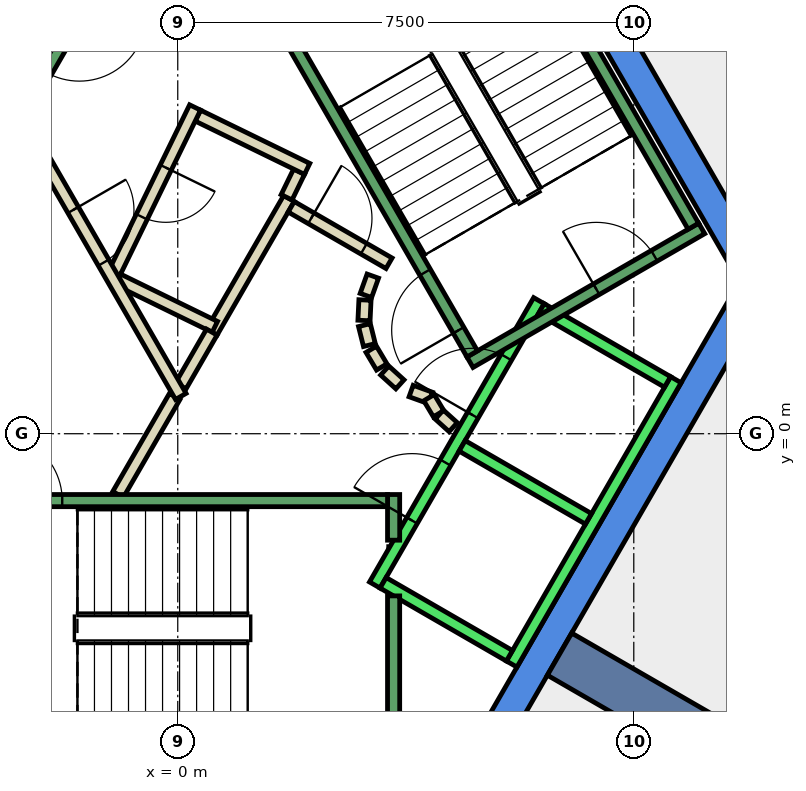
"""IFC4 building model, lengths in metres.
Left out: names, types, materials, properties, quantities, classifications, styles, units other than length and angle.
Written with IfcOpenShell. Run it as: python <this file> out.ifc"""

import sys

from ifc_helpers import new_model, si_unit, direction, frame, frame_2d, origin, place, context, subcontext, project, spatial, polyline, rectangle, outline, extrude, element, fill, save


model = new_model("IFC4")
c1 = context("Model", 3, precision=1e-05, world=origin(), true_north=direction((0.0, 1.0)))
c2 = subcontext(c1, "Body", "Model", "MODEL_VIEW")
j1 = project(units=[si_unit("LENGTHUNIT", "METRE"), si_unit("PLANEANGLEUNIT", "RADIAN")], contexts=[c1])
p1 = place(None, origin())
s1 = spatial("IfcSite", under=j1, at=p1, CompositionType="ELEMENT")
p2 = place(p1, origin())
s2 = spatial("IfcBuilding", under=s1, at=p2, CompositionType="ELEMENT")
p3 = place(p2, frame((0.0, 0.0, 308.0)))
s3 = spatial("IfcBuildingStorey", under=s2, at=p3, CompositionType="ELEMENT", Elevation=308.0)
p4 = place(p3, frame((0.0, 0.0, -0.34)))
e1 = element("IfcWall", 1, at=p4, inside=s3, PredefinedType="SHEAR", context=c2, shape_type="SweptSolid", body=[
    extrude(outline(polyline([(5.486, 9.998), (5.053, 9.748), (9.238, 2.5), (9.815, 2.5), (5.486, 9.998)])), origin(), (0.0, 0.0, 1.0), 3.6),
])
p5 = place(p3, frame((0.0, 0.0, -0.34)))
e2 = element("IfcWall", 2, at=p5, inside=s3, PredefinedType="SHEAR", context=c2, shape_type="SweptSolid", body=[
    extrude(outline(polyline([(4.907, -6.0), (9.815, 2.5), (9.238, 2.5), (4.619, -5.5), (4.907, -6.0)])), origin(), (0.0, 0.0, 1.0), 3.6),
])
p6 = place(p3, frame((6.279, -3.625, -0.34), z_axis=(0.0, 0.0, 1.0), x_axis=(0.866017533419, -0.500013631625, 0.0)))
e3 = element("IfcWall", 3, at=p6, inside=s3, PredefinedType="SHEAR", context=c2, shape_type="SweptSolid", body=[
    extrude(rectangle(XDim=9.0, YDim=0.8, at=frame_2d((4.5, 0.0))), origin(), (0.0, 0.0, 1.0), 3.6),
])
p7 = place(p3, frame((0.56, 1.671, 0.0), z_axis=(0.0, 0.0, 1.0), x_axis=(0.500008334558, 0.866020591771, 0.0)))
e4 = element("IfcWall", 4, at=p7, inside=s3, PredefinedType="PARTITIONING", context=c2, shape_type="SweptSolid", body=[
    extrude(rectangle(XDim=2.538, YDim=0.2, at=frame_2d((1.269, 0.0))), origin(), (0.0, 0.0, 1.0), 3.26),
])
p8 = place(p3, frame((1.79, 3.888, 0.0), z_axis=(0.0, 0.0, 1.0), x_axis=(0.437807406823, 0.899068781869, 0.0)))
e5 = element("IfcWall", 5, at=p8, inside=s3, PredefinedType="PARTITIONING", context=c2, shape_type="SweptSolid", body=[
    extrude(rectangle(XDim=0.469, YDim=0.2, at=frame_2d((0.234, 0.0))), origin(), (0.0, 0.0, 1.0), 3.26),
])
p9 = place(p3, frame((2.128, 4.355, 0.0), z_axis=(0.0, 0.0, 1.0), x_axis=(-0.898876404494, 0.438202247191, 0.0)))
e6 = element("IfcWall", 6, at=p9, inside=s3, PredefinedType="PARTITIONING", context=c2, shape_type="SweptSolid", body=[
    extrude(rectangle(XDim=1.999, YDim=0.2, at=frame_2d((1.0, 0.0))), origin(), (0.0, 0.0, 1.0), 3.26),
])
p10 = place(p3, frame((0.285, 5.365, 0.0), z_axis=(0.0, 0.0, 1.0), x_axis=(-0.43840190643, -0.898779043168, 0.0)))
e7 = element("IfcWall", 7, at=p10, inside=s3, PredefinedType="PARTITIONING", context=c2, shape_type="SweptSolid", body=[
    extrude(rectangle(XDim=3.1, YDim=0.2, at=frame_2d((1.55, 0.0))), origin(), (0.0, 0.0, 1.0), 3.26),
])
p11 = place(p10, frame((1.1, 0.0, 0.0)))
e8 = element("IfcOpeningElement", 8, at=p11, cuts=e7, PredefinedType="OPENING", context=c2, shape_type="SweptSolid", body=[
    extrude(rectangle(XDim=0.9, YDim=2.1, at=frame_2d((0.45, 1.05))), frame((0.0, 0.11, 0.0), z_axis=(0.0, -1.0, 0.0), x_axis=(1.0, 0.0, 0.0)), (0.0, 0.0, 1.0), 0.22),
])
p12 = place(p3, frame((-0.984, 2.535, 0.0), z_axis=(0.0, 0.0, 1.0), x_axis=(0.898707583217, -0.438548378025, 0.0)))
e9 = element("IfcWall", 9, at=p12, inside=s3, PredefinedType="PARTITIONING", context=c2, shape_type="SweptSolid", body=[
    extrude(rectangle(XDim=1.774, YDim=0.2, at=frame_2d((0.887, 0.0))), origin(), (0.0, 0.0, 1.0), 3.26),
])
p13 = place(p3, frame((8.588, 9.665, 0.0), z_axis=(0.0, 0.0, 1.0), x_axis=(0.499946799636, -0.86605611685, 0.0)))
e10 = element("IfcWall", 10, at=p13, inside=s3, PredefinedType="PARTITIONING", context=c2, shape_type="SweptSolid", body=[
    extrude(rectangle(XDim=8.227, YDim=0.2, at=frame_2d((4.114, 0.0))), origin(), (0.0, 0.0, 1.0), 3.26),
])
p14 = place(p13, frame((3.613, 0.0, 0.0)))
e11 = element("IfcOpeningElement", 11, at=p14, cuts=e10, PredefinedType="OPENING", context=c2, shape_type="SweptSolid", body=[
    extrude(rectangle(XDim=1.0, YDim=2.1, at=frame_2d((0.5, 1.05))), frame((0.0, 0.11, 0.0), z_axis=(0.0, -1.0, 0.0), x_axis=(1.0, 0.0, 0.0)), (0.0, 0.0, 1.0), 0.22),
])
p15 = place(p3, frame((-0.982, -1.0, 0.0), z_axis=(0.0, 0.0, 1.0), x_axis=(0.50024047865, 0.865886518847, 0.0)))
e12 = element("IfcWall", 12, at=p15, inside=s3, PredefinedType="PARTITIONING", context=c2, shape_type="SweptSolid", body=[
    extrude(rectangle(XDim=1.863, YDim=0.2, at=frame_2d((0.931, 0.0))), origin(), (0.0, 0.0, 1.0), 3.26),
])
p16 = place(p3, frame((0.05, 0.787, 0.0), z_axis=(0.0, 0.0, 1.0), x_axis=(0.499819111317, 0.866129814729, 0.0)))
e13 = element("IfcWall", 13, at=p16, inside=s3, PredefinedType="PARTITIONING", context=c2, shape_type="SweptSolid", body=[
    extrude(rectangle(XDim=1.021, YDim=0.2, at=frame_2d((0.51, 0.0))), origin(), (0.0, 0.0, 1.0), 3.26),
])
p17 = place(p3, frame((1.866, 3.732, 0.0), z_axis=(0.0, 0.0, 1.0), x_axis=(0.866043361281, -0.499968895414, 0.0)))
e14 = element("IfcWall", 14, at=p17, inside=s3, PredefinedType="PARTITIONING", context=c2, shape_type="SweptSolid", body=[
    extrude(rectangle(XDim=1.858, YDim=0.2, at=frame_2d((0.929, 0.0))), origin(), (0.0, 0.0, 1.0), 3.26),
])
p18 = place(p17, frame((0.379, 0.0, 0.0)))
e15 = element("IfcOpeningElement", 15, at=p18, cuts=e14, PredefinedType="OPENING", context=c2, shape_type="SweptSolid", body=[
    extrude(rectangle(XDim=1.0, YDim=2.1, at=frame_2d((0.5, 1.05))), frame((0.0, 0.11, 0.0), z_axis=(0.0, -1.0, 0.0), x_axis=(1.0, 0.0, 0.0)), (0.0, 0.0, 1.0), 0.22),
])
p19 = place(p3, frame((3.208, 2.592, 0.0), z_axis=(0.0, 0.0, 1.0), x_axis=(-0.337388820924, -0.941365382578, 0.0)))
e16 = element("IfcWall", 16, at=p19, inside=s3, PredefinedType="PARTITIONING", context=c2, shape_type="SweptSolid", body=[
    extrude(rectangle(XDim=0.338, YDim=0.2, at=frame_2d((0.169, 0.0))), origin(), (0.0, 0.0, 1.0), 3.26),
])
p20 = place(p3, frame((3.079, 2.199, 0.0), z_axis=(0.0, 0.0, 1.0), x_axis=(-0.047771483479, -0.998858290933, 0.0)))
e17 = element("IfcWall", 17, at=p20, inside=s3, PredefinedType="PARTITIONING", context=c2, shape_type="SweptSolid", body=[
    extrude(rectangle(XDim=0.337, YDim=0.2, at=frame_2d((0.169, 0.0))), origin(), (0.0, 0.0, 1.0), 3.26),
])
p21 = place(p3, frame((3.07, 1.786, 0.0), z_axis=(0.0, 0.0, 1.0), x_axis=(0.242705583207, -0.970099994784, 0.0)))
e18 = element("IfcWall", 18, at=p21, inside=s3, PredefinedType="PARTITIONING", context=c2, shape_type="SweptSolid", body=[
    extrude(rectangle(XDim=0.338, YDim=0.2, at=frame_2d((0.169, 0.0))), origin(), (0.0, 0.0, 1.0), 3.26),
])
for number, where, z_axis, x_axis in (
    (19, (3.182, 1.388, 0.0), (0.0, 0.0, 1.0), (0.512, -0.859, 0.0)),
    (20, (3.404, 1.039, 0.0), (0.0, 0.0, 1.0), (0.74, -0.672, 0.0)),
):
    element("IfcWall", number, at=place(p3, frame(where, z_axis=z_axis, x_axis=x_axis)), inside=s3, PredefinedType="PARTITIONING", context=c2, shape_type="SweptSolid", body=[
        extrude(rectangle(XDim=0.338, YDim=0.2, at=frame_2d((0.169, 0.0))), origin(), (0.0, 0.0, 1.0), 3.26),
    ])
p22 = place(p3, frame((3.838, 0.702, 0.0), z_axis=(0.0, 0.0, 1.0), x_axis=(0.941035081519, -0.338308993895, 0.0)))
e21 = element("IfcWall", 21, at=p22, inside=s3, PredefinedType="PARTITIONING", context=c2, shape_type="SweptSolid", body=[
    extrude(rectangle(XDim=0.337, YDim=0.2, at=frame_2d((0.168, 0.0))), origin(), (0.0, 0.0, 1.0), 3.26),
])
p23 = place(p3, frame((4.132, 0.593, 0.0), z_axis=(0.0, 0.0, 1.0), x_axis=(0.513561617048, -0.858052717201, 0.0)))
e22 = element("IfcWall", 22, at=p23, inside=s3, PredefinedType="PARTITIONING", context=c2, shape_type="SweptSolid", body=[
    extrude(rectangle(XDim=0.308, YDim=0.2, at=frame_2d((0.154, 0.0))), origin(), (0.0, 0.0, 1.0), 3.26),
])
p24 = place(p3, frame((4.301, 0.315, 0.0), z_axis=(0.0, 0.0, 1.0), x_axis=(0.741798017506, -0.670623367639, 0.0)))
e23 = element("IfcWall", 23, at=p24, inside=s3, PredefinedType="PARTITIONING", context=c2, shape_type="SweptSolid", body=[
    extrude(rectangle(XDim=0.309, YDim=0.2, at=frame_2d((0.154, 0.0))), origin(), (0.0, 0.0, 1.0), 3.26),
])
p25 = place(p3, frame((-2.54, 5.1, 0.0), z_axis=(0.0, 0.0, 1.0), x_axis=(0.499925051871, -0.866068670783, 0.0)))
e24 = element("IfcWall", 24, at=p25, inside=s3, PredefinedType="PARTITIONING", context=c2, shape_type="SweptSolid", body=[
    extrude(rectangle(XDim=5.181, YDim=0.2, at=frame_2d((2.59, 0.0))), origin(), (0.0, 0.0, 1.0), 3.26),
])
p26 = place(p25, frame((1.64, 0.0, 0.0)))
e25 = element("IfcOpeningElement", 25, at=p26, cuts=e24, PredefinedType="OPENING", context=c2, shape_type="SweptSolid", body=[
    extrude(rectangle(XDim=1.0, YDim=2.1, at=frame_2d((0.5, 1.05))), frame((0.0, 0.11, 0.0), z_axis=(0.0, -1.0, 0.0), x_axis=(1.0, 0.0, 0.0)), (0.0, 0.0, 1.0), 0.22),
])
p27 = place(p3, frame((3.24, -2.488, 0.0), z_axis=(0.0, 0.0, 1.0), x_axis=(0.500034260056, 0.866005622828, 0.0)))
e26 = element("IfcWall", 26, at=p27, inside=s3, PredefinedType="STANDARD", context=c2, shape_type="SweptSolid", body=[
    extrude(rectangle(XDim=5.399, YDim=0.2, at=frame_2d((2.7, 0.0))), origin(), (0.0, 0.0, 1.0), 3.26),
])
p28 = place(p27, frame((3.225, 0.0, 0.0)))
e27 = element("IfcOpeningElement", 27, at=p28, cuts=e26, PredefinedType="OPENING", context=c2, shape_type="SweptSolid", body=[
    extrude(rectangle(XDim=1.1, YDim=2.1, at=frame_2d((0.55, 1.05))), frame((0.0, 0.11, 0.0), z_axis=(0.0, -1.0, 0.0), x_axis=(1.0, 0.0, 0.0)), (0.0, 0.0, 1.0), 0.22),
])
p29 = place(p27, frame((1.225, 0.0, 0.0)))
e28 = element("IfcOpeningElement", 28, at=p29, cuts=e26, PredefinedType="OPENING", context=c2, shape_type="SweptSolid", body=[
    extrude(rectangle(XDim=1.1, YDim=2.1, at=frame_2d((0.55, 1.05))), frame((0.0, 0.11, 0.0), z_axis=(0.0, -1.0, 0.0), x_axis=(1.0, 0.0, 0.0)), (0.0, 0.0, 1.0), 0.22),
])
p30 = place(p3, frame((5.492, -3.788, 0.0), z_axis=(0.0, 0.0, 1.0), x_axis=(0.500034260056, 0.866005622828, 0.0)))
e29 = element("IfcWall", 29, at=p30, inside=s3, PredefinedType="STANDARD", context=c2, shape_type="SweptSolid", body=[
    extrude(rectangle(XDim=5.399, YDim=0.2, at=frame_2d((2.7, 0.0))), origin(), (0.0, 0.0, 1.0), 3.26),
])
p31 = place(p3, frame((3.377, -2.452, 0.0), z_axis=(0.0, 0.0, 1.0), x_axis=(0.865955154139, -0.50012165622, 0.0)))
e30 = element("IfcWall", 30, at=p31, inside=s3, PredefinedType="STANDARD", context=c2, shape_type="SweptSolid", body=[
    extrude(rectangle(XDim=2.4, YDim=0.2, at=frame_2d((1.2, 0.0))), origin(), (0.0, 0.0, 1.0), 3.26),
])
for number, where, z_axis, x_axis in (
    (31, (4.677, -0.2, 0.0), (0.0, 0.0, 1.0), (0.866, -0.5, 0.0)),
    (32, (5.977, 2.052, 0.0), (0.0, 0.0, 1.0), (0.866, -0.5, 0.0)),
):
    element("IfcWall", number, at=place(p3, frame(where, z_axis=z_axis, x_axis=x_axis)), inside=s3, PredefinedType="STANDARD", context=c2, shape_type="SweptSolid", body=[
        extrude(rectangle(XDim=2.399, YDim=0.2, at=frame_2d((1.2, 0.0))), origin(), (0.0, 0.0, 1.0), 3.26),
    ])
p32 = place(p3, frame((3.55, -2.667, 0.0), z_axis=(0.0, 0.0, 1.0), x_axis=(0.0, -1.0, 0.0)))
e33 = element("IfcWall", 33, at=p32, inside=s3, PredefinedType="STANDARD", context=c2, shape_type="SweptSolid", body=[
    extrude(rectangle(XDim=2.733, YDim=0.2, at=frame_2d((1.366, 0.0))), origin(), (0.0, 0.0, 1.0), 3.26),
])
p33 = place(p3, frame((3.55, -1.0, 0.0), z_axis=(0.0, 0.0, 1.0), x_axis=(0.0, -1.0, 0.0)))
e34 = element("IfcWall", 34, at=p33, inside=s3, PredefinedType="STANDARD", context=c2, shape_type="SweptSolid", body=[
    extrude(rectangle(XDim=0.751, YDim=0.2, at=frame_2d((0.375, 0.0))), origin(), (0.0, 0.0, 1.0), 3.26),
])
p34 = place(p3, frame((-3.45, -1.1, 0.0), z_axis=(0.0, 0.0, 1.0), x_axis=(1.0, 0.0, 0.0)))
e35 = element("IfcWall", 35, at=p34, inside=s3, PredefinedType="STANDARD", context=c2, shape_type="SweptSolid", body=[
    extrude(rectangle(XDim=6.9, YDim=0.2, at=frame_2d((3.45, 0.0))), origin(), (0.0, 0.0, 1.0), 3.26),
])
p35 = place(p34, frame((0.45, 0.0, 0.0)))
e36 = element("IfcOpeningElement", 36, at=p35, cuts=e35, PredefinedType="OPENING", context=c2, shape_type="SweptSolid", body=[
    extrude(rectangle(XDim=1.1, YDim=2.2, at=frame_2d((0.55, 1.1))), frame((0.0, 0.11, 0.0), z_axis=(0.0, -1.0, 0.0), x_axis=(1.0, 0.0, 0.0)), (0.0, 0.0, 1.0), 0.22),
])
p36 = place(p3, frame((4.806, 1.176, 0.0), z_axis=(0.0, 0.0, 1.0), x_axis=(0.866059941101, 0.499940174841, 0.0)))
e37 = element("IfcWall", 37, at=p36, inside=s3, PredefinedType="STANDARD", context=c2, shape_type="SweptSolid", body=[
    extrude(rectangle(XDim=4.4, YDim=0.2, at=frame_2d((2.2, 0.0))), origin(), (0.0, 0.0, 1.0), 3.26),
])
p37 = place(p36, frame((2.4, 0.0, 0.0)))
e38 = element("IfcOpeningElement", 38, at=p37, cuts=e37, PredefinedType="OPENING", context=c2, shape_type="SweptSolid", body=[
    extrude(rectangle(XDim=1.1, YDim=2.2, at=frame_2d((0.55, 1.1))), frame((0.0, 0.11, 0.0), z_axis=(0.0, -1.0, 0.0), x_axis=(1.0, 0.0, 0.0)), (0.0, 0.0, 1.0), 0.22),
])
p38 = place(p3, frame((4.843, 1.312, 0.0), z_axis=(0.0, 0.0, 1.0), x_axis=(-0.499963383562, 0.866046543262, 0.0)))
e39 = element("IfcWall", 39, at=p38, inside=s3, PredefinedType="STANDARD", context=c2, shape_type="SweptSolid", body=[
    extrude(rectangle(XDim=6.9, YDim=0.2, at=frame_2d((3.45, 0.0))), origin(), (0.0, 0.0, 1.0), 3.26),
])
p39 = place(p38, frame((0.45, 0.0, 0.0)))
e40 = element("IfcOpeningElement", 40, at=p39, cuts=e39, PredefinedType="OPENING", context=c2, shape_type="SweptSolid", body=[
    extrude(rectangle(XDim=1.1, YDim=2.2, at=frame_2d((0.55, 1.1))), frame((0.0, 0.11, 0.0), z_axis=(0.0, -1.0, 0.0), x_axis=(1.0, 0.0, 0.0)), (0.0, 0.0, 1.0), 0.22),
])
p40 = place(p3, frame((8.48, 3.412, 0.0), z_axis=(0.0, 0.0, 1.0), x_axis=(-0.499978703459, 0.866037698999, 0.0)))
e41 = element("IfcWall", 41, at=p40, inside=s3, PredefinedType="STANDARD", context=c2, shape_type="SweptSolid", body=[
    extrude(rectangle(XDim=6.9, YDim=0.2, at=frame_2d((3.45, 0.0))), origin(), (0.0, 0.0, 1.0), 3.26),
])
p41 = place(p3, frame((-1.393, 7.288, 0.0), z_axis=(0.0, 0.0, 1.0), x_axis=(-0.499963383562, -0.866046543262, 0.0)))
e42 = element("IfcWall", 42, at=p41, inside=s3, PredefinedType="STANDARD", context=c2, shape_type="SweptSolid", body=[
    extrude(rectangle(XDim=6.9, YDim=0.2, at=frame_2d((3.45, 0.0))), origin(), (0.0, 0.0, 1.0), 3.26),
])
p42 = place(p41, frame((0.45, 0.0, 0.0)))
e43 = element("IfcOpeningElement", 43, at=p42, cuts=e42, PredefinedType="OPENING", context=c2, shape_type="SweptSolid", body=[
    extrude(rectangle(XDim=1.1, YDim=2.2, at=frame_2d((0.55, 1.1))), frame((0.0, 0.11, 0.0), z_axis=(0.0, -1.0, 0.0), x_axis=(1.0, 0.0, 0.0)), (0.0, 0.0, 1.0), 0.22),
])
p43 = place(p18, origin())
e44 = element("IfcDoor", 44, at=p43, inside=s3, OperationType="SINGLE_SWING_LEFT", PredefinedType="DOOR", context=c2, shape_type="SweptSolid", body=[
    extrude(rectangle(XDim=1.0, YDim=2.1, at=frame_2d((0.5, 1.05))), frame((0.0, 0.025, 0.0), z_axis=(0.0, -1.0, 0.0), x_axis=(1.0, 0.0, 0.0)), (0.0, 0.0, 1.0), 0.05),
])
fill(e15, e44)
p44 = place(p26, origin())
e45 = element("IfcDoor", 45, at=p44, inside=s3, OperationType="SINGLE_SWING_RIGHT", PredefinedType="DOOR", context=c2, shape_type="SweptSolid", body=[
    extrude(rectangle(XDim=1.0, YDim=2.1, at=frame_2d((0.5, 1.05))), frame((0.0, 0.025, 0.0), z_axis=(0.0, -1.0, 0.0), x_axis=(1.0, 0.0, 0.0)), (0.0, 0.0, 1.0), 0.05),
])
fill(e25, e45)
p45 = place(p11, origin())
e46 = element("IfcDoor", 46, at=p45, inside=s3, OperationType="SINGLE_SWING_RIGHT", PredefinedType="DOOR", context=c2, shape_type="SweptSolid", body=[
    extrude(rectangle(XDim=0.9, YDim=2.1, at=frame_2d((0.45, 1.05))), frame((0.0, 0.025, 0.0), z_axis=(0.0, -1.0, 0.0), x_axis=(1.0, 0.0, 0.0)), (0.0, 0.0, 1.0), 0.05),
])
fill(e8, e46)
p46 = place(p28, origin())
e47 = element("IfcDoor", 47, at=p46, inside=s3, OperationType="SLIDING_TO_LEFT", PredefinedType="DOOR", context=c2, shape_type="SweptSolid", body=[
    extrude(rectangle(XDim=1.1, YDim=2.1, at=frame_2d((0.55, 1.05))), frame((0.0, 0.025, 0.0), z_axis=(0.0, -1.0, 0.0), x_axis=(1.0, 0.0, 0.0)), (0.0, 0.0, 1.0), 0.05),
])
fill(e27, e47)
p47 = place(p29, origin())
e48 = element("IfcDoor", 48, at=p47, inside=s3, OperationType="SLIDING_TO_LEFT", PredefinedType="DOOR", context=c2, shape_type="SweptSolid", body=[
    extrude(rectangle(XDim=1.1, YDim=2.1, at=frame_2d((0.55, 1.05))), frame((0.0, 0.025, 0.0), z_axis=(0.0, -1.0, 0.0), x_axis=(1.0, 0.0, 0.0)), (0.0, 0.0, 1.0), 0.05),
])
fill(e28, e48)
p48 = place(p35, origin())
e49 = element("IfcDoor", 49, at=p48, inside=s3, OperationType="SINGLE_SWING_LEFT", PredefinedType="DOOR", context=c2, shape_type="SweptSolid", body=[
    extrude(rectangle(XDim=1.1, YDim=2.2, at=frame_2d((0.55, 1.1))), frame((0.0, 0.025, 0.0), z_axis=(0.0, -1.0, 0.0), x_axis=(1.0, 0.0, 0.0)), (0.0, 0.0, 1.0), 0.05),
])
fill(e36, e49)
p49 = place(p39, origin())
e50 = element("IfcDoor", 50, at=p49, inside=s3, OperationType="SINGLE_SWING_LEFT", PredefinedType="DOOR", context=c2, shape_type="SweptSolid", body=[
    extrude(rectangle(XDim=1.1, YDim=2.2, at=frame_2d((0.55, 1.1))), frame((0.0, 0.025, 0.0), z_axis=(0.0, -1.0, 0.0), x_axis=(1.0, 0.0, 0.0)), (0.0, 0.0, 1.0), 0.05),
])
fill(e40, e50)
p50 = place(p37, origin())
e51 = element("IfcDoor", 51, at=p50, inside=s3, OperationType="SINGLE_SWING_LEFT", PredefinedType="DOOR", context=c2, shape_type="SweptSolid", body=[
    extrude(rectangle(XDim=1.1, YDim=2.2, at=frame_2d((0.55, 1.1))), frame((0.0, 0.025, 0.0), z_axis=(0.0, -1.0, 0.0), x_axis=(1.0, 0.0, 0.0)), (0.0, 0.0, 1.0), 0.05),
])
fill(e38, e51)
p51 = place(p42, origin())
e52 = element("IfcDoor", 52, at=p51, inside=s3, OperationType="SINGLE_SWING_LEFT", PredefinedType="DOOR", context=c2, shape_type="SweptSolid", body=[
    extrude(rectangle(XDim=1.1, YDim=2.2, at=frame_2d((0.55, 1.1))), frame((0.0, 0.025, 0.0), z_axis=(0.0, -1.0, 0.0), x_axis=(1.0, 0.0, 0.0)), (0.0, 0.0, 1.0), 0.05),
])
fill(e43, e52)
save(model, sys.argv[1])
